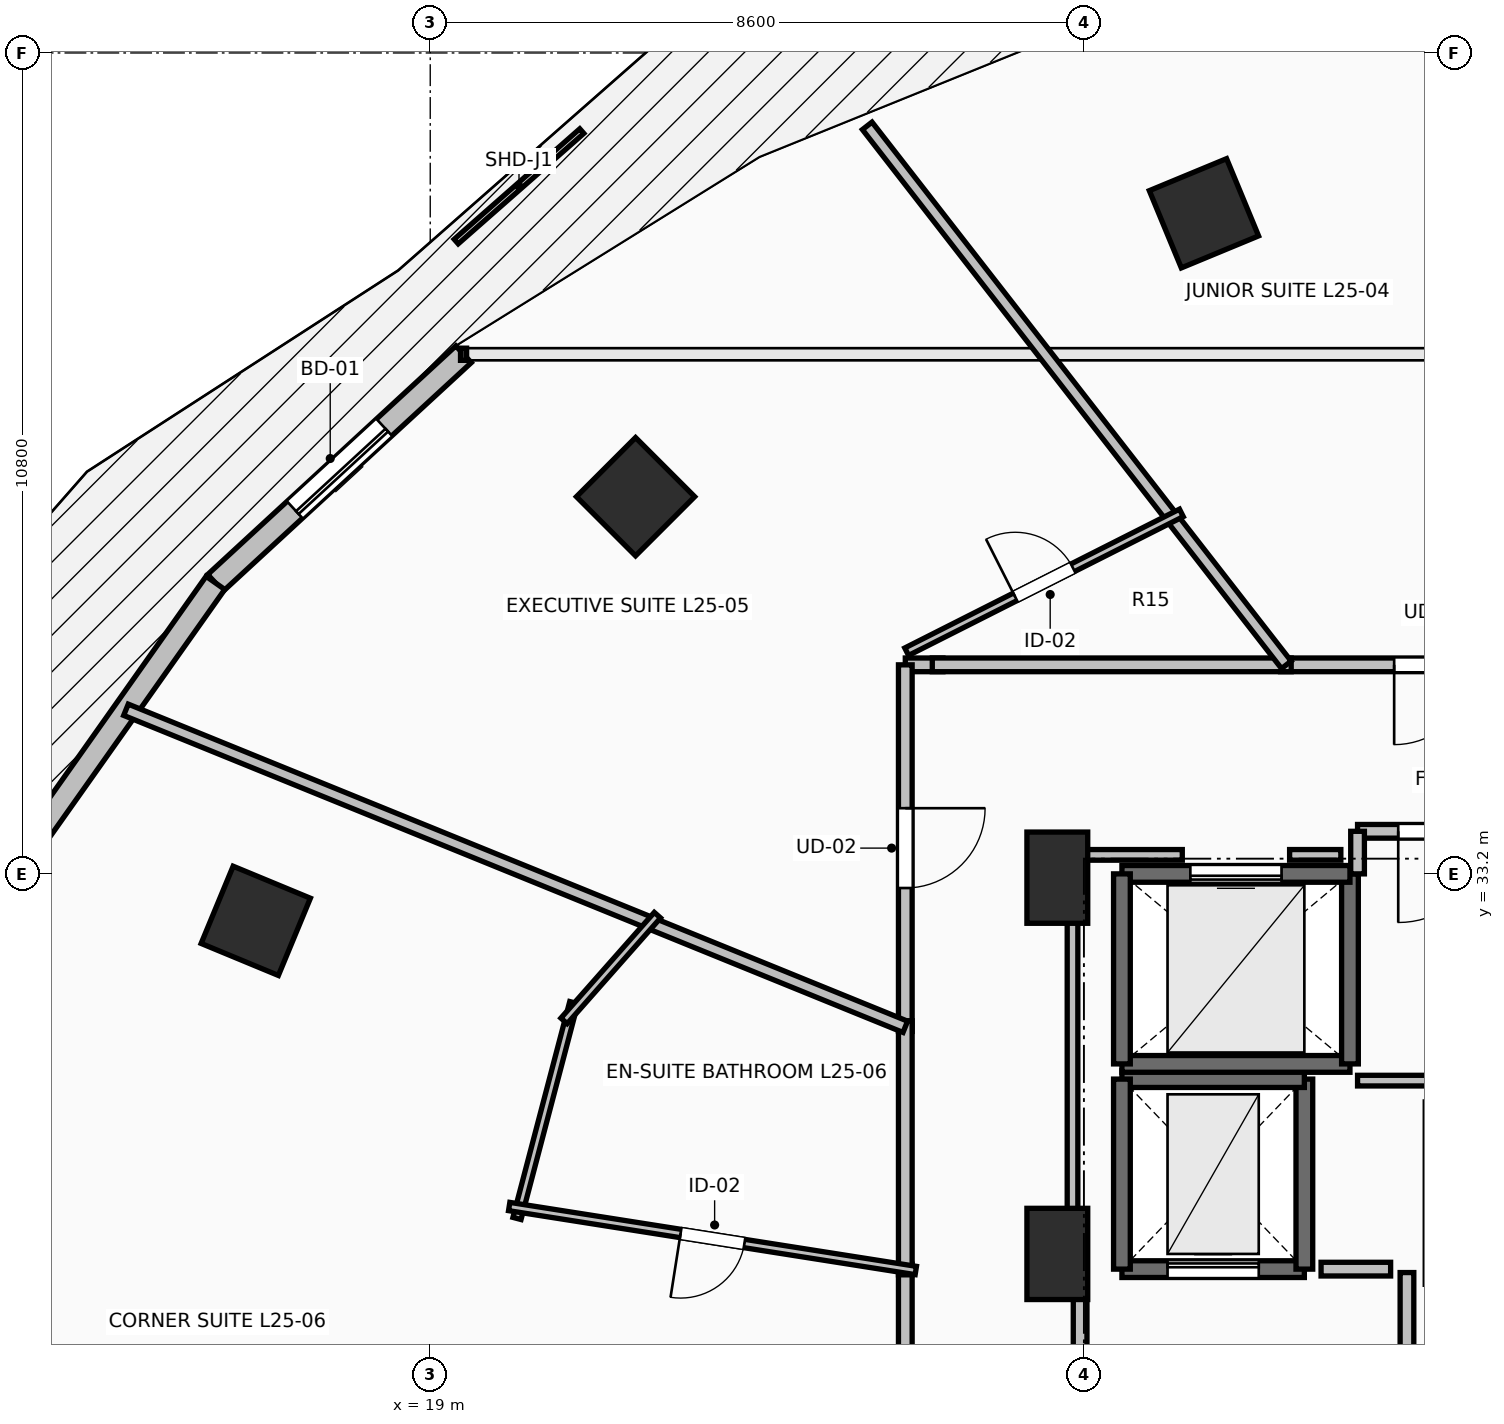
"""IFC4 building model, lengths in metres.
Left out: names, types, materials, properties, quantities, classifications, styles, units other than length and angle.
Written with IfcOpenShell. Run it as: python <this file> out.ifc"""

import sys

from ifc_helpers import new_model, si_unit, direction, frame, frame_2d, origin, origin_2d, place, context, subcontext, project, spatial, rectangle, extrude, element, fill, save


model = new_model("IFC4")
c1 = context("Model", 3, precision=1e-05, world=origin(), true_north=direction((0.0, 1.0)))
c2 = subcontext(c1, "Body", "Model", "MODEL_VIEW")
j1 = project(units=[si_unit("LENGTHUNIT", "METRE"), si_unit("PLANEANGLEUNIT", "RADIAN")], contexts=[c1])
p1 = place(None, origin())
s1 = spatial("IfcSite", under=j1, at=p1, CompositionType="ELEMENT")
p2 = place(p1, origin())
s2 = spatial("IfcBuilding", under=s1, at=p2, CompositionType="ELEMENT")
p3 = place(p2, frame((0.0, 0.0, 96.3)))
s3 = spatial("IfcBuildingStorey", under=s2, at=p3, CompositionType="ELEMENT", Elevation=96.3)
for number, where, z_axis, x_axis in (
    (1, (29.179, 41.891, 0.0), (0.0, 0.0, 1.0), (-0.383, 0.924, 0.0)),
    (2, (21.701, 38.162, 0.0), (0.0, 0.0, 1.0), (-0.707, 0.707, 0.0)),
    (3, (16.705, 32.582, 0.0), (0.0, 0.0, 1.0), (-0.924, 0.383, 0.0)),
):
    element("IfcColumn", number, at=place(p3, frame(where, z_axis=z_axis, x_axis=x_axis)), inside=s3, PredefinedType="COLUMN", context=c2, shape_type="SweptSolid", body=[
        extrude(rectangle(XDim=1.1, YDim=1.1, at=origin_2d()), origin(), (0.0, 0.0, 1.0), 3.5),
    ])
for number, where, z_axis, x_axis in (
    (4, (27.25, 28.2, 0.0), (0.0, 0.0, 1.0), (1.0, 0.0, 0.0)),
    (5, (27.25, 33.15, 0.0), (0.0, 0.0, 1.0), (1.0, 0.0, 0.0)),
):
    element("IfcColumn", number, at=place(p3, frame(where, z_axis=z_axis, x_axis=x_axis)), inside=s3, PredefinedType="PILASTER", context=c2, shape_type="SweptSolid", body=[
        extrude(rectangle(XDim=0.8, YDim=1.2, at=origin_2d()), origin(), (0.0, 0.0, 1.0), 3.5),
    ])
p4 = place(p3, frame((19.438, 40.036, 0.0), z_axis=(0.0, 0.0, 1.0), x_axis=(-0.735416718093, -0.677615119924, 0.0)))
e6 = element("IfcWall", 6, at=p4, inside=s3, PredefinedType="STANDARD", context=c2, shape_type="SweptSolid", body=[
    extrude(rectangle(XDim=4.439, YDim=0.3, at=frame_2d((2.22, 0.0))), origin(), (0.0, 0.0, 1.0), 3.24),
])
p5 = place(p4, frame((1.419, 0.0, 0.0)))
e7 = element("IfcOpeningElement", 7, at=p5, cuts=e6, PredefinedType="OPENING", context=c2, shape_type="SweptSolid", body=[
    extrude(rectangle(XDim=1.6, YDim=2.3, at=frame_2d((0.8, 1.15))), frame((0.0, 0.165, 0.0), z_axis=(0.0, -1.0, 0.0), x_axis=(1.0, 0.0, 0.0)), (0.0, 0.0, 1.0), 0.33),
])
p6 = place(p3, frame((16.174, 37.028, 0.0), z_axis=(0.0, 0.0, 1.0), x_axis=(-0.57716435238, -0.81662801222, 0.0)))
e8 = element("IfcWall", 8, at=p6, inside=s3, PredefinedType="STANDARD", context=c2, shape_type="SweptSolid", body=[
    extrude(rectangle(XDim=4.202, YDim=0.3, at=frame_2d((2.101, 0.0))), origin(), (0.0, 0.0, 1.0), 3.24),
])
p7 = place(p3, frame((28.1, 28.0, 0.0), z_axis=(0.0, 0.0, 1.0), x_axis=(1.0, 0.0, 0.0)))
e9 = element("IfcWall", 9, at=p7, inside=s3, PredefinedType="SHEAR", context=c2, shape_type="SweptSolid", body=[
    extrude(rectangle(XDim=2.4, YDim=0.22, at=frame_2d((1.2, 0.0))), origin(), (0.0, 0.0, 1.0), 3.24),
])
p8 = place(p7, frame((0.6, 0.0, 0.0)))
e10 = element("IfcOpeningElement", 10, at=p8, cuts=e9, PredefinedType="OPENING", context=c2, shape_type="SweptSolid", body=[
    extrude(rectangle(XDim=1.2, YDim=2.2, at=frame_2d((0.6, 1.1))), frame((0.0, 0.125, 0.0), z_axis=(0.0, -1.0, 0.0), x_axis=(1.0, 0.0, 0.0)), (0.0, 0.0, 1.0), 0.25),
])
p9 = place(p3, frame((30.5, 28.0, 0.0), z_axis=(0.0, 0.0, 1.0), x_axis=(0.0, 1.0, 0.0)))
e11 = element("IfcWall", 11, at=p9, inside=s3, PredefinedType="SHEAR", context=c2, shape_type="SweptSolid", body=[
    extrude(rectangle(XDim=2.5, YDim=0.22, at=frame_2d((1.25, 0.0))), origin(), (0.0, 0.0, 1.0), 3.24),
])
p10 = place(p3, frame((30.5, 30.5, 0.0), z_axis=(0.0, 0.0, 1.0), x_axis=(-1.0, 0.0, 0.0)))
e12 = element("IfcWall", 12, at=p10, inside=s3, PredefinedType="SHEAR", context=c2, shape_type="SweptSolid", body=[
    extrude(rectangle(XDim=2.4, YDim=0.22, at=frame_2d((1.2, 0.0))), origin(), (0.0, 0.0, 1.0), 3.24),
])
p11 = place(p3, frame((28.1, 30.5, 0.0), z_axis=(0.0, 0.0, 1.0), x_axis=(0.0, -1.0, 0.0)))
e13 = element("IfcWall", 13, at=p11, inside=s3, PredefinedType="SHEAR", context=c2, shape_type="SweptSolid", body=[
    extrude(rectangle(XDim=2.5, YDim=0.22, at=frame_2d((1.25, 0.0))), origin(), (0.0, 0.0, 1.0), 3.24),
])
p12 = place(p3, frame((28.1, 30.7, 0.0), z_axis=(0.0, 0.0, 1.0), x_axis=(1.0, 0.0, 0.0)))
e14 = element("IfcWall", 14, at=p12, inside=s3, PredefinedType="SOLIDWALL", context=c2, shape_type="SweptSolid", body=[
    extrude(rectangle(XDim=3.0, YDim=0.22, at=frame_2d((1.5, 0.0))), origin(), (0.0, 0.0, 1.0), 3.24),
])
p13 = place(p3, frame((31.1, 30.7, 0.0), z_axis=(0.0, 0.0, 1.0), x_axis=(0.0, 1.0, 0.0)))
e15 = element("IfcWall", 15, at=p13, inside=s3, PredefinedType="SOLIDWALL", context=c2, shape_type="SweptSolid", body=[
    extrude(rectangle(XDim=2.5, YDim=0.22, at=frame_2d((1.25, 0.0))), origin(), (0.0, 0.0, 1.0), 3.24),
])
p14 = place(p3, frame((31.1, 33.2, 0.0), z_axis=(0.0, 0.0, 1.0), x_axis=(-1.0, 0.0, 0.0)))
e16 = element("IfcWall", 16, at=p14, inside=s3, PredefinedType="SOLIDWALL", context=c2, shape_type="SweptSolid", body=[
    extrude(rectangle(XDim=3.0, YDim=0.22, at=frame_2d((1.5, 0.0))), origin(), (0.0, 0.0, 1.0), 3.24),
])
p15 = place(p14, frame((0.9, 0.0, 0.0)))
e17 = element("IfcOpeningElement", 17, at=p15, cuts=e16, PredefinedType="OPENING", context=c2, shape_type="SweptSolid", body=[
    extrude(rectangle(XDim=1.2, YDim=2.2, at=frame_2d((0.6, 1.1))), frame((0.0, 0.125, 0.0), z_axis=(0.0, -1.0, 0.0), x_axis=(1.0, 0.0, 0.0)), (0.0, 0.0, 1.0), 0.25),
])
p16 = place(p3, frame((28.1, 33.2, 0.0), z_axis=(0.0, 0.0, 1.0), x_axis=(0.0, -1.0, 0.0)))
e18 = element("IfcWall", 18, at=p16, inside=s3, PredefinedType="SOLIDWALL", context=c2, shape_type="SweptSolid", body=[
    extrude(rectangle(XDim=2.5, YDim=0.22, at=frame_2d((1.25, 0.0))), origin(), (0.0, 0.0, 1.0), 3.24),
])
p17 = place(p3, frame((31.85, 24.045, 0.0), z_axis=(0.0, 0.0, 1.0), x_axis=(0.0, 1.0, 0.0)))
e19 = element("IfcWall", 19, at=p17, inside=s3, PredefinedType="PARTITIONING", context=c2, shape_type="SweptSolid", body=[
    extrude(rectangle(XDim=3.91, YDim=0.18, at=frame_2d((1.955, 0.0))), origin(), (0.0, 0.0, 1.0), 3.24),
])
p18 = place(p17, frame((1.355, 0.0, 0.0)))
e20 = element("IfcOpeningElement", 20, at=p18, cuts=e19, PredefinedType="OPENING", context=c2, shape_type="SweptSolid", body=[
    extrude(rectangle(XDim=1.2, YDim=2.15, at=frame_2d((0.6, 1.075))), frame((0.0, 0.105, 0.0), z_axis=(0.0, -1.0, 0.0), x_axis=(1.0, 0.0, 0.0)), (0.0, 0.0, 1.0), 0.21),
])
p19 = place(p3, frame((27.55, 28.0, 0.0), z_axis=(0.0, 0.0, 1.0), x_axis=(0.0, -1.0, 0.0)))
e21 = element("IfcWall", 21, at=p19, inside=s3, PredefinedType="PARTITIONING", context=c2, shape_type="SweptSolid", body=[
    extrude(rectangle(XDim=4.05, YDim=0.18, at=frame_2d((2.025, 0.0))), origin(), (0.0, 0.0, 1.0), 3.24),
])
p20 = place(p19, frame((1.425, 0.0, 0.0)))
e22 = element("IfcOpeningElement", 22, at=p20, cuts=e21, PredefinedType="OPENING", context=c2, shape_type="SweptSolid", body=[
    extrude(rectangle(XDim=1.2, YDim=2.15, at=frame_2d((0.6, 1.075))), frame((0.0, 0.105, 0.0), z_axis=(0.0, -1.0, 0.0), x_axis=(1.0, 0.0, 0.0)), (0.0, 0.0, 1.0), 0.21),
])
p21 = place(p3, frame((33.47, 33.76, 0.0), z_axis=(0.0, 0.0, 1.0), x_axis=(-1.0, 0.0, 0.0)))
e23 = element("IfcWall", 23, at=p21, inside=s3, PredefinedType="PARTITIONING", context=c2, shape_type="SweptSolid", body=[
    extrude(rectangle(XDim=2.27, YDim=0.18, at=frame_2d((1.135, 0.0))), origin(), (0.0, 0.0, 1.0), 3.24),
])
p22 = place(p21, frame((0.535, 0.0, 0.0)))
e24 = element("IfcOpeningElement", 24, at=p22, cuts=e23, PredefinedType="OPENING", context=c2, shape_type="SweptSolid", body=[
    extrude(rectangle(XDim=1.2, YDim=2.15, at=frame_2d((0.6, 1.075))), frame((0.0, 0.105, 0.0), z_axis=(0.0, -1.0, 0.0), x_axis=(1.0, 0.0, 0.0)), (0.0, 0.0, 1.0), 0.21),
])
p23 = place(p3, frame((31.2, 33.76, 0.0), z_axis=(0.0, 0.0, 1.0), x_axis=(0.0, -1.0, 0.0)))
e25 = element("IfcWall", 25, at=p23, inside=s3, PredefinedType="PARTITIONING", context=c2, shape_type="SweptSolid", body=[
    extrude(rectangle(XDim=0.56, YDim=0.18, at=frame_2d((0.28, 0.0))), origin(), (0.0, 0.0, 1.0), 3.24),
])
p24 = place(p3, frame((34.226, 35.95, 0.0), z_axis=(0.0, 0.0, 1.0), x_axis=(-1.0, 0.0, 0.0)))
e26 = element("IfcWall", 26, at=p24, inside=s3, PredefinedType="PARTITIONING", context=c2, shape_type="SweptSolid", body=[
    extrude(rectangle(XDim=4.039, YDim=0.18, at=frame_2d((2.02, 0.0))), origin(), (0.0, 0.0, 1.0), 2.432),
])
p25 = place(p24, frame((1.494, 0.0, 0.0)))
e27 = element("IfcOpeningElement", 27, at=p25, cuts=e26, PredefinedType="OPENING", context=c2, shape_type="SweptSolid", body=[
    extrude(rectangle(XDim=1.05, YDim=2.2, at=frame_2d((0.525, 1.1))), frame((0.0, 0.105, 0.0), z_axis=(0.0, -1.0, 0.0), x_axis=(1.0, 0.0, 0.0)), (0.0, 0.0, 1.0), 0.21),
])
p26 = place(p3, frame((25.745, 35.95, 0.0), z_axis=(0.0, 0.0, 1.0), x_axis=(-1.0, 0.0, 0.0)))
e28 = element("IfcWall", 28, at=p26, inside=s3, PredefinedType="PARTITIONING", context=c2, shape_type="SweptSolid", body=[
    extrude(rectangle(XDim=0.495, YDim=0.18, at=frame_2d((0.248, 0.0))), origin(), (0.0, 0.0, 1.0), 3.24),
])
p27 = place(p3, frame((25.25, 35.95, 0.0), z_axis=(0.0, 0.0, 1.0), x_axis=(0.0, -1.0, 0.0)))
e29 = element("IfcWall", 29, at=p27, inside=s3, PredefinedType="PARTITIONING", context=c2, shape_type="SweptSolid", body=[
    extrude(rectangle(XDim=4.822, YDim=0.18, at=frame_2d((2.411, 0.0))), origin(), (0.0, 0.0, 1.0), 2.432),
])
p28 = place(p27, frame((1.886, 0.0, 0.0)))
e30 = element("IfcOpeningElement", 30, at=p28, cuts=e29, PredefinedType="OPENING", context=c2, shape_type="SweptSolid", body=[
    extrude(rectangle(XDim=1.05, YDim=2.2, at=frame_2d((0.525, 1.1))), frame((0.0, 0.105, 0.0), z_axis=(0.0, -1.0, 0.0), x_axis=(1.0, 0.0, 0.0)), (0.0, 0.0, 1.0), 0.21),
])
p29 = place(p3, frame((30.327, 35.95, 0.0), z_axis=(0.0, 0.0, 1.0), x_axis=(-1.0, 0.0, 0.0)))
e31 = element("IfcWall", 31, at=p29, inside=s3, PredefinedType="PARTITIONING", context=c2, shape_type="SweptSolid", body=[
    extrude(rectangle(XDim=4.722, YDim=0.18, at=frame_2d((2.361, 0.0))), origin(), (0.0, 0.0, 1.0), 2.432),
])
p30 = place(p3, frame((25.25, 28.065, 0.0), z_axis=(0.0, 0.0, 1.0), x_axis=(0.0, -1.0, 0.0)))
e32 = element("IfcWall", 32, at=p30, inside=s3, PredefinedType="PARTITIONING", context=c2, shape_type="SweptSolid", body=[
    extrude(rectangle(XDim=3.89, YDim=0.18, at=frame_2d((1.945, 0.0))), origin(), (0.0, 0.0, 1.0), 2.432),
])
p31 = place(p30, frame((1.42, 0.0, 0.0)))
e33 = element("IfcOpeningElement", 33, at=p31, cuts=e32, PredefinedType="OPENING", context=c2, shape_type="SweptSolid", body=[
    extrude(rectangle(XDim=1.05, YDim=2.2, at=frame_2d((0.525, 1.1))), frame((0.0, 0.105, 0.0), z_axis=(0.0, -1.0, 0.0), x_axis=(1.0, 0.0, 0.0)), (0.0, 0.0, 1.0), 0.21),
])
p32 = place(p3, frame((25.25, 31.268, 0.0), z_axis=(0.0, 0.0, 1.0), x_axis=(0.0, -1.0, 0.0)))
e34 = element("IfcWall", 34, at=p32, inside=s3, PredefinedType="PARTITIONING", context=c2, shape_type="SweptSolid", body=[
    extrude(rectangle(XDim=3.343, YDim=0.18, at=frame_2d((1.671, 0.0))), origin(), (0.0, 0.0, 1.0), 2.432),
])
p33 = place(p3, frame((24.749, 43.041, 0.0), z_axis=(0.0, 0.0, 1.0), x_axis=(0.61384652665, -0.789425387051, 0.0)))
e35 = element("IfcWall", 35, at=p33, inside=s3, PredefinedType="PARTITIONING", context=c2, shape_type="SweptSolid", body=[
    extrude(rectangle(XDim=8.983, YDim=0.16, at=frame_2d((4.491, 0.0))), origin(), (0.0, 0.0, 1.0), 2.432),
])
p34 = place(p3, frame((25.268, 36.123, 0.0), z_axis=(0.0, 0.0, 1.0), x_axis=(0.892501687321, 0.451044053425, 0.0)))
e36 = element("IfcWall", 36, at=p34, inside=s3, PredefinedType="PARTITIONING", context=c2, shape_type="SweptSolid", body=[
    extrude(rectangle(XDim=4.049, YDim=0.11, at=frame_2d((2.025, 0.0))), origin(), (0.0, 0.0, 1.0), 2.432),
])
p35 = place(p34, frame((1.6, 0.0, 0.0)))
e37 = element("IfcOpeningElement", 37, at=p35, cuts=e36, PredefinedType="OPENING", context=c2, shape_type="SweptSolid", body=[
    extrude(rectangle(XDim=0.85, YDim=2.1, at=frame_2d((0.425, 1.05))), frame((0.0, 0.07, 0.0), z_axis=(0.0, -1.0, 0.0), x_axis=(1.0, 0.0, 0.0)), (0.0, 0.0, 1.0), 0.14),
])
p36 = place(p3, frame((14.997, 35.359, 0.0), z_axis=(0.0, 0.0, 1.0), x_axis=(0.926288615834, -0.376814808861, 0.0)))
e38 = element("IfcWall", 38, at=p36, inside=s3, PredefinedType="PARTITIONING", context=c2, shape_type="SweptSolid", body=[
    extrude(rectangle(XDim=11.069, YDim=0.16, at=frame_2d((5.534, 0.0))), origin(), (0.0, 0.0, 1.0), 2.677),
])
p37 = place(p3, frame((20.141, 28.667, 0.0), z_axis=(0.0, 0.0, 1.0), x_axis=(0.254489206931, 0.967075614187, 0.0)))
e39 = element("IfcWall", 39, at=p37, inside=s3, PredefinedType="PARTITIONING", context=c2, shape_type="SweptSolid", body=[
    extrude(rectangle(XDim=2.937, YDim=0.11, at=frame_2d((1.468, 0.0))), origin(), (0.0, 0.0, 1.0), 2.432),
])
p38 = place(p3, frame((20.76, 31.266, 0.0), z_axis=(0.0, 0.0, 1.0), x_axis=(0.662008805554, 0.749496058275, 0.0)))
e40 = element("IfcWall", 40, at=p38, inside=s3, PredefinedType="PARTITIONING", context=c2, shape_type="SweptSolid", body=[
    extrude(rectangle(XDim=1.856, YDim=0.11, at=frame_2d((0.928, 0.0))), origin(), (0.0, 0.0, 1.0), 2.922),
])
p39 = place(p3, frame((25.388, 27.982, 0.0), z_axis=(0.0, 0.0, 1.0), x_axis=(-0.98785054141, 0.155406910513, 0.0)))
e41 = element("IfcWall", 41, at=p39, inside=s3, PredefinedType="PARTITIONING", context=c2, shape_type="SweptSolid", body=[
    extrude(rectangle(XDim=5.415, YDim=0.11, at=frame_2d((2.708, 0.0))), origin(), (0.0, 0.0, 1.0), 2.432),
])
p40 = place(p39, frame((2.283, 0.0, 0.0)))
e42 = element("IfcOpeningElement", 42, at=p40, cuts=e41, PredefinedType="OPENING", context=c2, shape_type="SweptSolid", body=[
    extrude(rectangle(XDim=0.85, YDim=2.1, at=frame_2d((0.425, 1.05))), frame((0.0, 0.07, 0.0), z_axis=(0.0, -1.0, 0.0), x_axis=(1.0, 0.0, 0.0)), (0.0, 0.0, 1.0), 0.14),
])
p41 = place(p3, frame((31.635, 28.0, 0.0), z_axis=(0.0, 0.0, 1.0), x_axis=(-1.0, 0.0, 0.0)))
e43 = element("IfcWall", 43, at=p41, inside=s3, PredefinedType="PARTITIONING", context=c2, shape_type="SweptSolid", body=[
    extrude(rectangle(XDim=0.915, YDim=0.18, at=frame_2d((0.458, 0.0))), origin(), (0.0, 0.0, 1.0), 3.24),
])
p42 = place(p3, frame((31.2, 30.48, 0.0), z_axis=(0.0, 0.0, 1.0), x_axis=(1.0, 0.0, 0.0)))
e44 = element("IfcWall", 44, at=p42, inside=s3, PredefinedType="PARTITIONING", context=c2, shape_type="SweptSolid", body=[
    extrude(rectangle(XDim=2.05, YDim=0.14, at=frame_2d((1.025, 0.0))), origin(), (0.0, 0.0, 1.0), 3.24),
])
p43 = place(p3, frame((27.45, 28.196, 0.0), z_axis=(0.0, 0.0, 1.0), x_axis=(0.0, 1.0, 0.0)))
e45 = element("IfcWall", 45, at=p43, inside=s3, PredefinedType="PARTITIONING", context=c2, shape_type="SweptSolid", body=[
    extrude(rectangle(XDim=5.254, YDim=0.14, at=frame_2d((2.627, 0.0))), origin(), (0.0, 0.0, 1.0), 2.432),
])
p44 = place(p3, frame((27.45, 33.45, 0.0), z_axis=(0.0, 0.0, 1.0), x_axis=(1.0, 0.0, 0.0)))
e46 = element("IfcWall", 46, at=p44, inside=s3, PredefinedType="PARTITIONING", context=c2, shape_type="SweptSolid", body=[
    extrude(rectangle(XDim=1.444, YDim=0.14, at=frame_2d((0.722, 0.0))), origin(), (0.0, 0.0, 1.0), 2.432),
])
p45 = place(p3, frame((30.306, 33.45, 0.0), z_axis=(0.0, 0.0, 1.0), x_axis=(1.0, 0.0, 0.0)))
e47 = element("IfcWall", 47, at=p45, inside=s3, PredefinedType="PARTITIONING", context=c2, shape_type="SweptSolid", body=[
    extrude(rectangle(XDim=0.674, YDim=0.14, at=frame_2d((0.337, 0.0))), origin(), (0.0, 0.0, 1.0), 3.24),
])
p46 = place(p5, origin())
e48 = element("IfcDoor", 48, at=p46, inside=s3, OperationType="SLIDING_TO_LEFT", PredefinedType="DOOR", context=c2, shape_type="SweptSolid", body=[
    extrude(rectangle(XDim=1.6, YDim=2.3, at=frame_2d((0.8, 1.15))), frame((0.0, 0.025, 0.0), z_axis=(0.0, -1.0, 0.0), x_axis=(1.0, 0.0, 0.0)), (0.0, 0.0, 1.0), 0.05),
])
fill(e7, e48)
p47 = place(p8, origin())
e49 = element("IfcDoor", 49, at=p47, inside=s3, OperationType="SLIDING_TO_LEFT", PredefinedType="DOOR", context=c2, shape_type="SweptSolid", body=[
    extrude(rectangle(XDim=1.2, YDim=2.2, at=frame_2d((0.6, 1.1))), frame((0.0, 0.025, 0.0), z_axis=(0.0, -1.0, 0.0), x_axis=(1.0, 0.0, 0.0)), (0.0, 0.0, 1.0), 0.05),
])
fill(e10, e49)
p48 = place(p15, origin())
e50 = element("IfcDoor", 50, at=p48, inside=s3, OperationType="SLIDING_TO_LEFT", PredefinedType="DOOR", context=c2, shape_type="SweptSolid", body=[
    extrude(rectangle(XDim=1.2, YDim=2.2, at=frame_2d((0.6, 1.1))), frame((0.0, 0.025, 0.0), z_axis=(0.0, -1.0, 0.0), x_axis=(1.0, 0.0, 0.0)), (0.0, 0.0, 1.0), 0.05),
])
fill(e17, e50)
p49 = place(p22, origin())
e51 = element("IfcDoor", 51, at=p49, inside=s3, OperationType="SINGLE_SWING_RIGHT", PredefinedType="DOOR", context=c2, shape_type="SweptSolid", body=[
    extrude(rectangle(XDim=1.2, YDim=2.15, at=frame_2d((0.6, 1.075))), frame((0.0, 0.025, 0.0), z_axis=(0.0, -1.0, 0.0), x_axis=(1.0, 0.0, 0.0)), (0.0, 0.0, 1.0), 0.05),
])
fill(e24, e51)
p50 = place(p25, origin())
e52 = element("IfcDoor", 52, at=p50, inside=s3, OperationType="SINGLE_SWING_RIGHT", PredefinedType="DOOR", context=c2, shape_type="SweptSolid", body=[
    extrude(rectangle(XDim=1.05, YDim=2.2, at=frame_2d((0.525, 1.1))), frame((0.0, 0.025, 0.0), z_axis=(0.0, -1.0, 0.0), x_axis=(1.0, 0.0, 0.0)), (0.0, 0.0, 1.0), 0.05),
])
fill(e27, e52)
p51 = place(p28, origin())
e53 = element("IfcDoor", 53, at=p51, inside=s3, OperationType="SINGLE_SWING_LEFT", PredefinedType="DOOR", context=c2, shape_type="SweptSolid", body=[
    extrude(rectangle(XDim=1.05, YDim=2.2, at=frame_2d((0.525, 1.1))), frame((0.0, 0.025, 0.0), z_axis=(0.0, -1.0, 0.0), x_axis=(1.0, 0.0, 0.0)), (0.0, 0.0, 1.0), 0.05),
])
fill(e30, e53)
p52 = place(p35, origin())
e54 = element("IfcDoor", 54, at=p52, inside=s3, OperationType="SINGLE_SWING_LEFT", PredefinedType="DOOR", context=c2, shape_type="SweptSolid", body=[
    extrude(rectangle(XDim=0.85, YDim=2.1, at=frame_2d((0.425, 1.05))), frame((0.0, 0.025, 0.0), z_axis=(0.0, -1.0, 0.0), x_axis=(1.0, 0.0, 0.0)), (0.0, 0.0, 1.0), 0.05),
])
fill(e37, e54)
p53 = place(p40, origin())
e55 = element("IfcDoor", 55, at=p53, inside=s3, OperationType="SINGLE_SWING_RIGHT", PredefinedType="DOOR", context=c2, shape_type="SweptSolid", body=[
    extrude(rectangle(XDim=0.85, YDim=2.1, at=frame_2d((0.425, 1.05))), frame((0.0, 0.025, 0.0), z_axis=(0.0, -1.0, 0.0), x_axis=(1.0, 0.0, 0.0)), (0.0, 0.0, 1.0), 0.05),
])
fill(e42, e55)
save(model, sys.argv[1])
